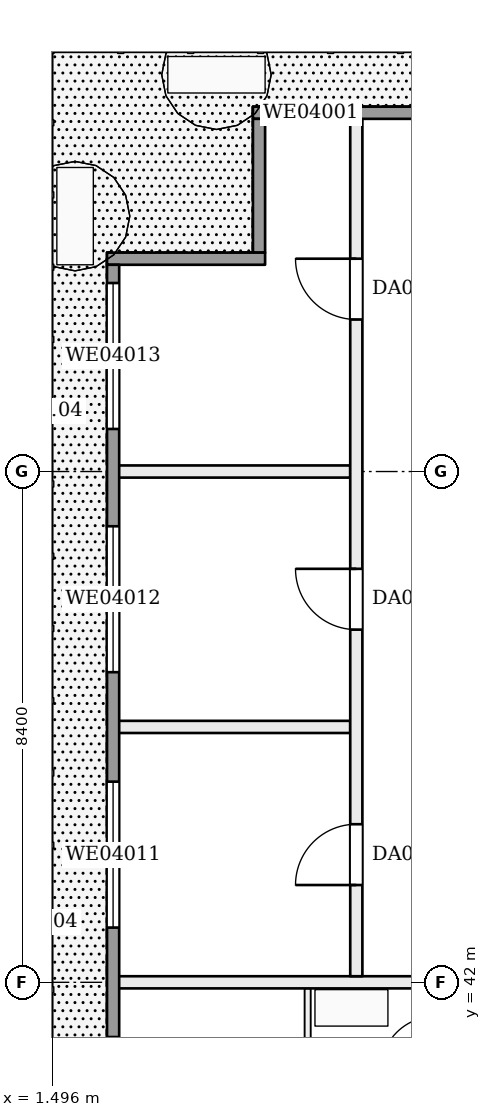
"""IFC4 building model, lengths in metres.
Left out: names, types, materials, properties, quantities, classifications, styles, units other than length and angle.
Written with IfcOpenShell. Run it as: python <this file> out.ifc"""

import sys

from ifc_helpers import new_model, si_unit, direction, frame, frame_2d, origin, place, context, subcontext, project, spatial, rectangle, extrude, element, fill, save


model = new_model("IFC4")
c1 = context("Model", 3, precision=1e-05, world=origin(), true_north=direction((0.0, 1.0)))
c2 = subcontext(c1, "Body", "Model", "MODEL_VIEW")
j1 = project(units=[si_unit("LENGTHUNIT", "METRE"), si_unit("PLANEANGLEUNIT", "RADIAN")], contexts=[c1])
p1 = place(None, origin())
s1 = spatial("IfcSite", under=j1, at=p1, CompositionType="ELEMENT")
p2 = place(p1, origin())
s2 = spatial("IfcBuilding", under=s1, at=p2, CompositionType="ELEMENT")
p3 = place(p2, frame((0.0, 0.0, 25.2)))
s3 = spatial("IfcBuildingStorey", under=s2, at=p3, CompositionType="ELEMENT", Elevation=25.2)
p4 = place(p3, frame((2.5, 42.0, 0.0), z_axis=(0.0, 0.0, 1.0), x_axis=(1.0, 0.0, 0.0)))
e1 = element("IfcWall", 1, at=p4, inside=s3, PredefinedType="PARTITIONING", context=c2, shape_type="SweptSolid", body=[
    extrude(rectangle(XDim=5.9, YDim=0.2, at=frame_2d((2.95, 0.0))), origin(), (0.0, 0.0, 1.0), 3.22),
])
for number, where, z_axis, x_axis in (
    (2, (2.5, 46.2, 0.0), (0.0, 0.0, 1.0), (1.0, 0.0, 0.0)),
    (3, (2.5, 50.4, 0.0), (0.0, 0.0, 1.0), (1.0, 0.0, 0.0)),
):
    element("IfcWall", number, at=place(p3, frame(where, z_axis=z_axis, x_axis=x_axis)), inside=s3, PredefinedType="PARTITIONING", context=c2, shape_type="SweptSolid", body=[
        extrude(rectangle(XDim=3.9, YDim=0.2, at=frame_2d((1.95, 0.0))), origin(), (0.0, 0.0, 1.0), 3.22),
    ])
p5 = place(p3, frame((5.7, 37.9, 0.0), z_axis=(0.0, 0.0, 1.0), x_axis=(0.0, 1.0, 0.0)))
e4 = element("IfcWall", 4, at=p5, inside=s3, PredefinedType="PARTITIONING", context=c2, shape_type="SweptSolid", body=[
    extrude(rectangle(XDim=4.0, YDim=0.1, at=frame_2d((2.0, 0.0))), origin(), (0.0, 0.0, 1.0), 3.22),
])
p6 = place(p5, frame((1.5, 0.0, 0.0)))
e5 = element("IfcOpeningElement", 5, at=p6, cuts=e4, PredefinedType="OPENING", context=c2, shape_type="SweptSolid", body=[
    extrude(rectangle(XDim=0.9, YDim=2.1, at=frame_2d((0.45, 1.05))), frame((0.0, 0.06, 0.0), z_axis=(0.0, -1.0, 0.0), x_axis=(1.0, 0.0, 0.0)), (0.0, 0.0, 1.0), 0.12),
])
p7 = place(p3, frame((6.5, 42.1, 0.0), z_axis=(0.0, 0.0, 1.0), x_axis=(0.0, 1.0, 0.0)))
e6 = element("IfcWall", 6, at=p7, inside=s3, PredefinedType="PARTITIONING", context=c2, shape_type="SweptSolid", body=[
    extrude(rectangle(XDim=14.2, YDim=0.2, at=frame_2d((7.1, 0.0))), origin(), (0.0, 0.0, 1.0), 3.22),
])
p8 = place(p7, frame((1.5, 0.0, 0.0)))
e7 = element("IfcOpeningElement", 7, at=p8, cuts=e6, PredefinedType="OPENING", context=c2, shape_type="SweptSolid", body=[
    extrude(rectangle(XDim=1.0, YDim=2.1, at=frame_2d((0.5, 1.05))), frame((0.0, 0.11, 0.0), z_axis=(0.0, -1.0, 0.0), x_axis=(1.0, 0.0, 0.0)), (0.0, 0.0, 1.0), 0.22),
])
p9 = place(p7, frame((5.7, 0.0, 0.0)))
e8 = element("IfcOpeningElement", 8, at=p9, cuts=e6, PredefinedType="OPENING", context=c2, shape_type="SweptSolid", body=[
    extrude(rectangle(XDim=1.0, YDim=2.1, at=frame_2d((0.5, 1.05))), frame((0.0, 0.11, 0.0), z_axis=(0.0, -1.0, 0.0), x_axis=(1.0, 0.0, 0.0)), (0.0, 0.0, 1.0), 0.22),
])
p10 = place(p7, frame((10.8, 0.0, 0.0)))
e9 = element("IfcOpeningElement", 9, at=p10, cuts=e6, PredefinedType="OPENING", context=c2, shape_type="SweptSolid", body=[
    extrude(rectangle(XDim=1.0, YDim=2.1, at=frame_2d((0.5, 1.05))), frame((0.0, 0.11, 0.0), z_axis=(0.0, -1.0, 0.0), x_axis=(1.0, 0.0, 0.0)), (0.0, 0.0, 1.0), 0.22),
])
p11 = place(p3, frame((8.4, 56.3, 0.0), z_axis=(0.0, 0.0, 1.0), x_axis=(-1.0, 0.0, 0.0)))
e10 = element("IfcWall", 10, at=p11, inside=s3, PredefinedType="SOLIDWALL", context=c2, shape_type="SweptSolid", body=[
    extrude(rectangle(XDim=3.6, YDim=0.2, at=frame_2d((1.8, 0.0))), origin(), (0.0, 0.0, 1.0), 3.22),
])
p12 = place(p11, frame((2.0, 0.0, 0.9)))
e11 = element("IfcOpeningElement", 11, at=p12, cuts=e10, PredefinedType="OPENING", context=c2, shape_type="SweptSolid", body=[
    extrude(rectangle(XDim=1.3, YDim=1.5, at=frame_2d((0.65, 0.75))), frame((0.0, 0.11, 0.0), z_axis=(0.0, -1.0, 0.0), x_axis=(1.0, 0.0, 0.0)), (0.0, 0.0, 1.0), 0.22),
])
p13 = place(p3, frame((4.9, 56.2, 0.0), z_axis=(0.0, 0.0, 1.0), x_axis=(0.0, -1.0, 0.0)))
e12 = element("IfcWall", 12, at=p13, inside=s3, PredefinedType="SOLIDWALL", context=c2, shape_type="SweptSolid", body=[
    extrude(rectangle(XDim=2.2, YDim=0.2, at=frame_2d((1.1, 0.0))), origin(), (0.0, 0.0, 1.0), 3.22),
])
p14 = place(p3, frame((5.0, 53.9, 0.0), z_axis=(0.0, 0.0, 1.0), x_axis=(-1.0, 0.0, 0.0)))
e13 = element("IfcWall", 13, at=p14, inside=s3, PredefinedType="SOLIDWALL", context=c2, shape_type="SweptSolid", body=[
    extrude(rectangle(XDim=2.6, YDim=0.2, at=frame_2d((1.3, 0.0))), origin(), (0.0, 0.0, 1.0), 3.22),
])
p15 = place(p3, frame((2.5, 53.8, 0.0), z_axis=(0.0, 0.0, 1.0), x_axis=(0.0, -1.0, 0.0)))
e14 = element("IfcWall", 14, at=p15, inside=s3, PredefinedType="SOLIDWALL", context=c2, shape_type="SweptSolid", body=[
    extrude(rectangle(XDim=48.8, YDim=0.2, at=frame_2d((24.4, 0.0))), origin(), (0.0, 0.0, 1.0), 3.22),
])
p16 = place(p15, frame((46.1, 0.0, 0.0)))
e15 = element("IfcOpeningElement", 15, at=p16, cuts=e14, PredefinedType="OPENING", context=c2, shape_type="SweptSolid", body=[
    extrude(rectangle(XDim=2.4, YDim=2.2, at=frame_2d((1.2, 1.1))), frame((0.0, 0.11, 0.0), z_axis=(0.0, -1.0, 0.0), x_axis=(1.0, 0.0, 0.0)), (0.0, 0.0, 1.0), 0.22),
])
p17 = place(p15, frame((42.1, 0.0, 0.0)))
e16 = element("IfcOpeningElement", 16, at=p17, cuts=e14, PredefinedType="OPENING", context=c2, shape_type="SweptSolid", body=[
    extrude(rectangle(XDim=2.4, YDim=2.2, at=frame_2d((1.2, 1.1))), frame((0.0, 0.11, 0.0), z_axis=(0.0, -1.0, 0.0), x_axis=(1.0, 0.0, 0.0)), (0.0, 0.0, 1.0), 0.22),
])
p18 = place(p15, frame((37.9, 0.0, 0.0)))
e17 = element("IfcOpeningElement", 17, at=p18, cuts=e14, PredefinedType="OPENING", context=c2, shape_type="SweptSolid", body=[
    extrude(rectangle(XDim=2.4, YDim=2.2, at=frame_2d((1.2, 1.1))), frame((0.0, 0.11, 0.0), z_axis=(0.0, -1.0, 0.0), x_axis=(1.0, 0.0, 0.0)), (0.0, 0.0, 1.0), 0.22),
])
p19 = place(p15, frame((33.7, 0.0, 0.0)))
e18 = element("IfcOpeningElement", 18, at=p19, cuts=e14, PredefinedType="OPENING", context=c2, shape_type="SweptSolid", body=[
    extrude(rectangle(XDim=2.4, YDim=2.2, at=frame_2d((1.2, 1.1))), frame((0.0, 0.11, 0.0), z_axis=(0.0, -1.0, 0.0), x_axis=(1.0, 0.0, 0.0)), (0.0, 0.0, 1.0), 0.22),
])
p20 = place(p15, frame((29.5, 0.0, 0.0)))
e19 = element("IfcOpeningElement", 19, at=p20, cuts=e14, PredefinedType="OPENING", context=c2, shape_type="SweptSolid", body=[
    extrude(rectangle(XDim=2.4, YDim=2.2, at=frame_2d((1.2, 1.1))), frame((0.0, 0.11, 0.0), z_axis=(0.0, -1.0, 0.0), x_axis=(1.0, 0.0, 0.0)), (0.0, 0.0, 1.0), 0.22),
])
p21 = place(p15, frame((25.3, 0.0, 0.9)))
e20 = element("IfcOpeningElement", 20, at=p21, cuts=e14, PredefinedType="OPENING", context=c2, shape_type="SweptSolid", body=[
    extrude(rectangle(XDim=2.4, YDim=1.5, at=frame_2d((1.2, 0.75))), frame((0.0, 0.11, 0.0), z_axis=(0.0, -1.0, 0.0), x_axis=(1.0, 0.0, 0.0)), (0.0, 0.0, 1.0), 0.22),
])
p22 = place(p15, frame((21.1, 0.0, 0.0)))
e21 = element("IfcOpeningElement", 21, at=p22, cuts=e14, PredefinedType="OPENING", context=c2, shape_type="SweptSolid", body=[
    extrude(rectangle(XDim=2.4, YDim=2.2, at=frame_2d((1.2, 1.1))), frame((0.0, 0.11, 0.0), z_axis=(0.0, -1.0, 0.0), x_axis=(1.0, 0.0, 0.0)), (0.0, 0.0, 1.0), 0.22),
])
p23 = place(p15, frame((16.9, 0.0, 0.0)))
e22 = element("IfcOpeningElement", 22, at=p23, cuts=e14, PredefinedType="OPENING", context=c2, shape_type="SweptSolid", body=[
    extrude(rectangle(XDim=2.4, YDim=2.2, at=frame_2d((1.2, 1.1))), frame((0.0, 0.11, 0.0), z_axis=(0.0, -1.0, 0.0), x_axis=(1.0, 0.0, 0.0)), (0.0, 0.0, 1.0), 0.22),
])
p24 = place(p15, frame((12.7, 0.0, 0.0)))
e23 = element("IfcOpeningElement", 23, at=p24, cuts=e14, PredefinedType="OPENING", context=c2, shape_type="SweptSolid", body=[
    extrude(rectangle(XDim=2.4, YDim=2.2, at=frame_2d((1.2, 1.1))), frame((0.0, 0.11, 0.0), z_axis=(0.0, -1.0, 0.0), x_axis=(1.0, 0.0, 0.0)), (0.0, 0.0, 1.0), 0.22),
])
p25 = place(p15, frame((8.5, 0.0, 0.9)))
e24 = element("IfcOpeningElement", 24, at=p25, cuts=e14, PredefinedType="OPENING", context=c2, shape_type="SweptSolid", body=[
    extrude(rectangle(XDim=2.4, YDim=1.5, at=frame_2d((1.2, 0.75))), frame((0.0, 0.11, 0.0), z_axis=(0.0, -1.0, 0.0), x_axis=(1.0, 0.0, 0.0)), (0.0, 0.0, 1.0), 0.22),
])
p26 = place(p15, frame((4.3, 0.0, 0.9)))
e25 = element("IfcOpeningElement", 25, at=p26, cuts=e14, PredefinedType="OPENING", context=c2, shape_type="SweptSolid", body=[
    extrude(rectangle(XDim=2.4, YDim=1.5, at=frame_2d((1.2, 0.75))), frame((0.0, 0.11, 0.0), z_axis=(0.0, -1.0, 0.0), x_axis=(1.0, 0.0, 0.0)), (0.0, 0.0, 1.0), 0.22),
])
p27 = place(p15, frame((0.3, 0.0, 0.9)))
e26 = element("IfcOpeningElement", 26, at=p27, cuts=e14, PredefinedType="OPENING", context=c2, shape_type="SweptSolid", body=[
    extrude(rectangle(XDim=2.4, YDim=1.5, at=frame_2d((1.2, 0.75))), frame((0.0, 0.11, 0.0), z_axis=(0.0, -1.0, 0.0), x_axis=(1.0, 0.0, 0.0)), (0.0, 0.0, 1.0), 0.22),
])
p28 = place(p8, origin())
e27 = element("IfcDoor", 27, at=p28, inside=s3, OperationType="SINGLE_SWING_LEFT", PredefinedType="DOOR", context=c2, shape_type="SweptSolid", body=[
    extrude(rectangle(XDim=1.0, YDim=2.1, at=frame_2d((0.5, 1.05))), frame((0.0, 0.025, 0.0), z_axis=(0.0, -1.0, 0.0), x_axis=(1.0, 0.0, 0.0)), (0.0, 0.0, 1.0), 0.05),
])
fill(e7, e27)
p29 = place(p9, origin())
e28 = element("IfcDoor", 28, at=p29, inside=s3, OperationType="SINGLE_SWING_RIGHT", PredefinedType="DOOR", context=c2, shape_type="SweptSolid", body=[
    extrude(rectangle(XDim=1.0, YDim=2.1, at=frame_2d((0.5, 1.05))), frame((0.0, 0.025, 0.0), z_axis=(0.0, -1.0, 0.0), x_axis=(1.0, 0.0, 0.0)), (0.0, 0.0, 1.0), 0.05),
])
fill(e8, e28)
p30 = place(p10, origin())
e29 = element("IfcDoor", 29, at=p30, inside=s3, OperationType="SINGLE_SWING_RIGHT", PredefinedType="DOOR", context=c2, shape_type="SweptSolid", body=[
    extrude(rectangle(XDim=1.0, YDim=2.1, at=frame_2d((0.5, 1.05))), frame((0.0, 0.025, 0.0), z_axis=(0.0, -1.0, 0.0), x_axis=(1.0, 0.0, 0.0)), (0.0, 0.0, 1.0), 0.05),
])
fill(e9, e29)
p31 = place(p12, origin())
e30 = element("IfcWindow", 30, at=p31, inside=s3, PartitioningType="SINGLE_PANEL", PredefinedType="WINDOW", context=c2, shape_type="SweptSolid", body=[
    extrude(rectangle(XDim=1.3, YDim=1.5, at=frame_2d((0.65, 0.75))), frame((0.0, 0.03, 0.0), z_axis=(0.0, -1.0, 0.0), x_axis=(1.0, 0.0, 0.0)), (0.0, 0.0, 1.0), 0.06),
])
fill(e11, e30)
p32 = place(p25, origin())
e31 = element("IfcWindow", 31, at=p32, inside=s3, PartitioningType="SINGLE_PANEL", PredefinedType="WINDOW", context=c2, shape_type="SweptSolid", body=[
    extrude(rectangle(XDim=2.4, YDim=1.5, at=frame_2d((1.2, 0.75))), frame((0.0, 0.03, 0.0), z_axis=(0.0, -1.0, 0.0), x_axis=(1.0, 0.0, 0.0)), (0.0, 0.0, 1.0), 0.06),
])
fill(e24, e31)
p33 = place(p26, origin())
e32 = element("IfcWindow", 32, at=p33, inside=s3, PartitioningType="SINGLE_PANEL", PredefinedType="WINDOW", context=c2, shape_type="SweptSolid", body=[
    extrude(rectangle(XDim=2.4, YDim=1.5, at=frame_2d((1.2, 0.75))), frame((0.0, 0.03, 0.0), z_axis=(0.0, -1.0, 0.0), x_axis=(1.0, 0.0, 0.0)), (0.0, 0.0, 1.0), 0.06),
])
fill(e25, e32)
p34 = place(p27, origin())
e33 = element("IfcWindow", 33, at=p34, inside=s3, PartitioningType="SINGLE_PANEL", PredefinedType="WINDOW", context=c2, shape_type="SweptSolid", body=[
    extrude(rectangle(XDim=2.4, YDim=1.5, at=frame_2d((1.2, 0.75))), frame((0.0, 0.03, 0.0), z_axis=(0.0, -1.0, 0.0), x_axis=(1.0, 0.0, 0.0)), (0.0, 0.0, 1.0), 0.06),
])
fill(e26, e33)
save(model, sys.argv[1])
